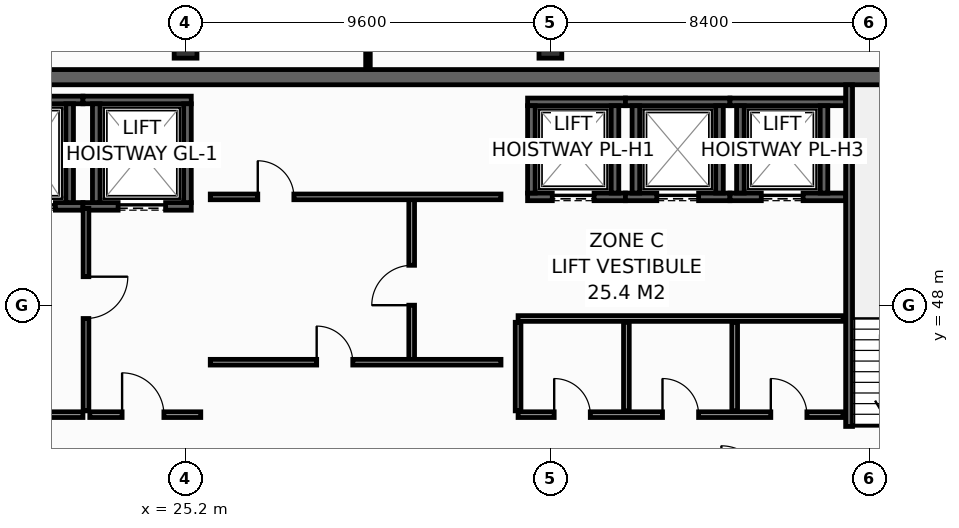
"""IFC4 building model, lengths in metres.
Left out: names, types, materials, properties, quantities, classifications, styles, units other than length and angle.
Written with IfcOpenShell. Run it as: python <this file> out.ifc"""

import sys

from ifc_helpers import new_model, si_unit, direction, frame, frame_2d, origin, origin_2d, place, context, subcontext, project, spatial, rectangle, hollow_rectangle, extrude, element, fill, save


model = new_model("IFC4")
c1 = context("Model", 3, precision=1e-05, world=origin(), true_north=direction((0.0, 1.0)))
c2 = subcontext(c1, "Body", "Model", "MODEL_VIEW")
j1 = project(units=[si_unit("LENGTHUNIT", "METRE"), si_unit("PLANEANGLEUNIT", "RADIAN")], contexts=[c1])
p1 = place(None, origin())
s1 = spatial("IfcSite", under=j1, at=p1, CompositionType="ELEMENT")
p2 = place(p1, origin())
s2 = spatial("IfcBuilding", under=s1, at=p2, CompositionType="ELEMENT")
p3 = place(p2, frame((0.0, 0.0, 264.8)))
s3 = spatial("IfcBuildingStorey", under=s2, at=p3, CompositionType="ELEMENT", Elevation=264.8)
p4 = place(p3, frame((13.7, 54.0, 0.0), z_axis=(0.0, 0.0, 1.0), x_axis=(1.0, 0.0, 0.0)))
e1 = element("IfcWall", 1, at=p4, inside=s3, PredefinedType="SHEAR", context=c2, shape_type="SweptSolid", body=[
    extrude(rectangle(XDim=32.5, YDim=0.4, at=frame_2d((16.25, 0.0))), origin(), (0.0, 0.0, 1.0), 3.55),
])
for number, where, z_axis, x_axis in (
    (2, (25.2, 54.8, 0.0), (0.0, 0.0, 1.0), (1.0, 0.0, 0.0)),
    (3, (34.8, 54.8, 0.0), (0.0, 0.0, 1.0), (1.0, 0.0, 0.0)),
):
    element("IfcColumn", number, at=place(p3, frame(where, z_axis=z_axis, x_axis=x_axis)), inside=s3, PredefinedType="COLUMN", context=c2, shape_type="SweptSolid", body=[
        extrude(hollow_rectangle(XDim=0.6, YDim=0.6, WallThickness=0.028, at=origin_2d()), origin(), (0.0, 0.0, 1.0), 3.8),
    ])
p5 = place(p3, frame((19.85, 50.6, 0.0), z_axis=(0.0, 0.0, 1.0), x_axis=(1.0, 0.0, 0.0)))
e4 = element("IfcWall", 4, at=p5, inside=s3, PredefinedType="SHEAR", context=c2, shape_type="SweptSolid", body=[
    extrude(rectangle(XDim=2.65, YDim=0.2, at=frame_2d((1.325, 0.0))), origin(), (0.0, 0.0, 1.0), 3.55),
])
p6 = place(p5, frame((0.675, 0.0, 0.0)))
e5 = element("IfcOpeningElement", 5, at=p6, cuts=e4, PredefinedType="OPENING", context=c2, shape_type="SweptSolid", body=[
    extrude(rectangle(XDim=1.25, YDim=2.3, at=frame_2d((0.625, 1.15))), frame((0.0, 0.11, 0.0), z_axis=(0.0, -1.0, 0.0), x_axis=(1.0, 0.0, 0.0)), (0.0, 0.0, 1.0), 0.22),
])
p7 = place(p3, frame((19.85, 53.4, 0.0), z_axis=(0.0, 0.0, 1.0), x_axis=(1.0, 0.0, 0.0)))
e6 = element("IfcWall", 6, at=p7, inside=s3, PredefinedType="SHEAR", context=c2, shape_type="SweptSolid", body=[
    extrude(rectangle(XDim=2.65, YDim=0.2, at=frame_2d((1.325, 0.0))), origin(), (0.0, 0.0, 1.0), 3.55),
])
p8 = place(p3, frame((22.15, 50.7, 0.0), z_axis=(0.0, 0.0, 1.0), x_axis=(0.0, 1.0, 0.0)))
e7 = element("IfcWall", 7, at=p8, inside=s3, PredefinedType="SHEAR", context=c2, shape_type="SweptSolid", body=[
    extrude(rectangle(XDim=2.6, YDim=0.2, at=frame_2d((1.3, 0.0))), origin(), (0.0, 0.0, 1.0), 3.55),
])
p9 = place(p3, frame((22.5, 50.6, 0.0), z_axis=(0.0, 0.0, 1.0), x_axis=(1.0, 0.0, 0.0)))
e8 = element("IfcWall", 8, at=p9, inside=s3, PredefinedType="SHEAR", context=c2, shape_type="SweptSolid", body=[
    extrude(rectangle(XDim=2.85, YDim=0.2, at=frame_2d((1.425, 0.0))), origin(), (0.0, 0.0, 1.0), 3.55),
])
p10 = place(p9, frame((0.925, 0.0, 0.0)))
e9 = element("IfcOpeningElement", 9, at=p10, cuts=e8, PredefinedType="OPENING", context=c2, shape_type="SweptSolid", body=[
    extrude(rectangle(XDim=1.25, YDim=2.3, at=frame_2d((0.625, 1.15))), frame((0.0, 0.11, 0.0), z_axis=(0.0, -1.0, 0.0), x_axis=(1.0, 0.0, 0.0)), (0.0, 0.0, 1.0), 0.22),
])
p11 = place(p3, frame((22.5, 53.4, 0.0), z_axis=(0.0, 0.0, 1.0), x_axis=(1.0, 0.0, 0.0)))
e10 = element("IfcWall", 10, at=p11, inside=s3, PredefinedType="SHEAR", context=c2, shape_type="SweptSolid", body=[
    extrude(rectangle(XDim=2.85, YDim=0.2, at=frame_2d((1.425, 0.0))), origin(), (0.0, 0.0, 1.0), 3.55),
])
for number, where, z_axis, x_axis in (
    (11, (22.85, 50.7, 0.0), (0.0, 0.0, 1.0), (0.0, 1.0, 0.0)),
    (12, (25.25, 50.7, 0.0), (0.0, 0.0, 1.0), (0.0, 1.0, 0.0)),
):
    element("IfcWall", number, at=place(p3, frame(where, z_axis=z_axis, x_axis=x_axis)), inside=s3, PredefinedType="SHEAR", context=c2, shape_type="SweptSolid", body=[
        extrude(rectangle(XDim=2.6, YDim=0.2, at=frame_2d((1.3, 0.0))), origin(), (0.0, 0.0, 1.0), 3.55),
    ])
p12 = place(p3, frame((34.2, 50.85, 0.0), z_axis=(0.0, 0.0, 1.0), x_axis=(1.0, 0.0, 0.0)))
e13 = element("IfcWall", 13, at=p12, inside=s3, PredefinedType="SHEAR", context=c2, shape_type="SweptSolid", body=[
    extrude(rectangle(XDim=2.575, YDim=0.2, at=frame_2d((1.288, 0.0))), origin(), (0.0, 0.0, 1.0), 3.55),
])
p13 = place(p12, frame((0.65, 0.0, 0.0)))
e14 = element("IfcOpeningElement", 14, at=p13, cuts=e13, PredefinedType="OPENING", context=c2, shape_type="SweptSolid", body=[
    extrude(rectangle(XDim=1.1, YDim=2.2, at=frame_2d((0.55, 1.1))), frame((0.0, 0.11, 0.0), z_axis=(0.0, -1.0, 0.0), x_axis=(1.0, 0.0, 0.0)), (0.0, 0.0, 1.0), 0.22),
])
p14 = place(p3, frame((34.2, 53.35, 0.0), z_axis=(0.0, 0.0, 1.0), x_axis=(1.0, 0.0, 0.0)))
e15 = element("IfcWall", 15, at=p14, inside=s3, PredefinedType="SHEAR", context=c2, shape_type="SweptSolid", body=[
    extrude(rectangle(XDim=2.575, YDim=0.2, at=frame_2d((1.288, 0.0))), origin(), (0.0, 0.0, 1.0), 3.55),
])
for number, where, z_axis, x_axis in (
    (16, (34.3, 50.95, 0.0), (0.0, 0.0, 1.0), (0.0, 1.0, 0.0)),
    (17, (36.5, 50.95, 0.0), (0.0, 0.0, 1.0), (0.0, 1.0, 0.0)),
):
    element("IfcWall", number, at=place(p3, frame(where, z_axis=z_axis, x_axis=x_axis)), inside=s3, PredefinedType="SHEAR", context=c2, shape_type="SweptSolid", body=[
        extrude(rectangle(XDim=2.3, YDim=0.2, at=frame_2d((1.15, 0.0))), origin(), (0.0, 0.0, 1.0), 3.55),
    ])
p15 = place(p3, frame((36.775, 50.85, 0.0), z_axis=(0.0, 0.0, 1.0), x_axis=(1.0, 0.0, 0.0)))
e18 = element("IfcWall", 18, at=p15, inside=s3, PredefinedType="SHEAR", context=c2, shape_type="SweptSolid", body=[
    extrude(rectangle(XDim=2.75, YDim=0.2, at=frame_2d((1.375, 0.0))), origin(), (0.0, 0.0, 1.0), 3.55),
])
p16 = place(p15, frame((0.825, 0.0, 0.0)))
e19 = element("IfcOpeningElement", 19, at=p16, cuts=e18, PredefinedType="OPENING", context=c2, shape_type="SweptSolid", body=[
    extrude(rectangle(XDim=1.1, YDim=2.2, at=frame_2d((0.55, 1.1))), frame((0.0, 0.11, 0.0), z_axis=(0.0, -1.0, 0.0), x_axis=(1.0, 0.0, 0.0)), (0.0, 0.0, 1.0), 0.22),
])
p17 = place(p3, frame((36.775, 53.35, 0.0), z_axis=(0.0, 0.0, 1.0), x_axis=(1.0, 0.0, 0.0)))
e20 = element("IfcWall", 20, at=p17, inside=s3, PredefinedType="SHEAR", context=c2, shape_type="SweptSolid", body=[
    extrude(rectangle(XDim=2.75, YDim=0.2, at=frame_2d((1.375, 0.0))), origin(), (0.0, 0.0, 1.0), 3.55),
])
for number, where, z_axis, x_axis in (
    (21, (37.05, 50.95, 0.0), (0.0, 0.0, 1.0), (0.0, 1.0, 0.0)),
    (22, (39.25, 50.95, 0.0), (0.0, 0.0, 1.0), (0.0, 1.0, 0.0)),
):
    element("IfcWall", number, at=place(p3, frame(where, z_axis=z_axis, x_axis=x_axis)), inside=s3, PredefinedType="SHEAR", context=c2, shape_type="SweptSolid", body=[
        extrude(rectangle(XDim=2.3, YDim=0.2, at=frame_2d((1.15, 0.0))), origin(), (0.0, 0.0, 1.0), 3.55),
    ])
p18 = place(p3, frame((39.525, 50.85, 0.0), z_axis=(0.0, 0.0, 1.0), x_axis=(1.0, 0.0, 0.0)))
e23 = element("IfcWall", 23, at=p18, inside=s3, PredefinedType="SHEAR", context=c2, shape_type="SweptSolid", body=[
    extrude(rectangle(XDim=3.045, YDim=0.2, at=frame_2d((1.522, 0.0))), origin(), (0.0, 0.0, 1.0), 3.55),
])
p19 = place(p18, frame((0.825, 0.0, 0.0)))
e24 = element("IfcOpeningElement", 24, at=p19, cuts=e23, PredefinedType="OPENING", context=c2, shape_type="SweptSolid", body=[
    extrude(rectangle(XDim=1.1, YDim=2.2, at=frame_2d((0.55, 1.1))), frame((0.0, 0.11, 0.0), z_axis=(0.0, -1.0, 0.0), x_axis=(1.0, 0.0, 0.0)), (0.0, 0.0, 1.0), 0.22),
])
p20 = place(p3, frame((39.525, 53.35, 0.0), z_axis=(0.0, 0.0, 1.0), x_axis=(1.0, 0.0, 0.0)))
e25 = element("IfcWall", 25, at=p20, inside=s3, PredefinedType="SHEAR", context=c2, shape_type="SweptSolid", body=[
    extrude(rectangle(XDim=3.045, YDim=0.2, at=frame_2d((1.522, 0.0))), origin(), (0.0, 0.0, 1.0), 3.55),
])
for number, where, z_axis, x_axis in (
    (26, (39.8, 50.95, 0.0), (0.0, 0.0, 1.0), (0.0, 1.0, 0.0)),
    (27, (42.0, 50.95, 0.0), (0.0, 0.0, 1.0), (0.0, 1.0, 0.0)),
):
    element("IfcWall", number, at=place(p3, frame(where, z_axis=z_axis, x_axis=x_axis)), inside=s3, PredefinedType="SHEAR", context=c2, shape_type="SweptSolid", body=[
        extrude(rectangle(XDim=2.3, YDim=0.2, at=frame_2d((1.15, 0.0))), origin(), (0.0, 0.0, 1.0), 3.55),
    ])
p21 = place(p3, frame((42.66, 53.8, 0.0), z_axis=(0.0, 0.0, 1.0), x_axis=(0.0, -1.0, 0.0)))
e28 = element("IfcWall", 28, at=p21, inside=s3, PredefinedType="SHEAR", context=c2, shape_type="SweptSolid", body=[
    extrude(rectangle(XDim=10.4, YDim=0.18, at=frame_2d((5.2, 0.0))), origin(), (0.0, 0.0, 1.0), 3.55),
])
p22 = place(p21, frame((8.99, 0.0, 0.0)))
e29 = element("IfcOpeningElement", 29, at=p22, cuts=e28, PredefinedType="OPENING", context=c2, shape_type="SweptSolid", body=[
    extrude(rectangle(XDim=1.1, YDim=2.15, at=frame_2d((0.55, 1.075))), frame((0.0, 0.1, 0.0), z_axis=(0.0, -1.0, 0.0), x_axis=(1.0, 0.0, 0.0)), (0.0, 0.0, 1.0), 0.2),
])
p23 = place(p3, frame((17.36, 45.12, 0.0), z_axis=(0.0, 0.0, 1.0), x_axis=(1.0, 0.0, 0.0)))
e30 = element("IfcWall", 30, at=p23, inside=s3, PredefinedType="PARTITIONING", context=c2, shape_type="SweptSolid", body=[
    extrude(rectangle(XDim=5.14, YDim=0.15, at=frame_2d((2.57, 0.0))), origin(), (0.0, 0.0, 1.0), 3.55),
])
p24 = place(p23, frame((1.8, 0.0, 0.0)))
e31 = element("IfcOpeningElement", 31, at=p24, cuts=e30, PredefinedType="OPENING", context=c2, shape_type="SweptSolid", body=[
    extrude(rectangle(XDim=1.1, YDim=2.15, at=frame_2d((0.55, 1.075))), frame((0.0, 0.085, 0.0), z_axis=(0.0, -1.0, 0.0), x_axis=(1.0, 0.0, 0.0)), (0.0, 0.0, 1.0), 0.17),
])
p25 = place(p3, frame((22.58, 50.55, 0.0), z_axis=(0.0, 0.0, 1.0), x_axis=(0.0, -1.0, 0.0)))
e32 = element("IfcWall", 32, at=p25, inside=s3, PredefinedType="PARTITIONING", context=c2, shape_type="SweptSolid", body=[
    extrude(rectangle(XDim=5.33, YDim=0.15, at=frame_2d((2.665, 0.0))), origin(), (0.0, 0.0, 1.0), 3.55),
])
p26 = place(p25, frame((1.8, 0.0, 0.0)))
e33 = element("IfcOpeningElement", 33, at=p26, cuts=e32, PredefinedType="OPENING", context=c2, shape_type="SweptSolid", body=[
    extrude(rectangle(XDim=1.1, YDim=2.15, at=frame_2d((0.55, 1.075))), frame((0.0, 0.085, 0.0), z_axis=(0.0, -1.0, 0.0), x_axis=(1.0, 0.0, 0.0)), (0.0, 0.0, 1.0), 0.17),
])
p27 = place(p3, frame((22.68, 45.12, 0.0), z_axis=(0.0, 0.0, 1.0), x_axis=(1.0, 0.0, 0.0)))
e34 = element("IfcWall", 34, at=p27, inside=s3, PredefinedType="PARTITIONING", context=c2, shape_type="SweptSolid", body=[
    extrude(rectangle(XDim=2.92, YDim=0.15, at=frame_2d((1.46, 0.0))), origin(), (0.0, 0.0, 1.0), 3.55),
])
p28 = place(p27, frame((0.85, 0.0, 0.0)))
e35 = element("IfcOpeningElement", 35, at=p28, cuts=e34, PredefinedType="OPENING", context=c2, shape_type="SweptSolid", body=[
    extrude(rectangle(XDim=1.1, YDim=2.15, at=frame_2d((0.55, 1.075))), frame((0.0, 0.085, 0.0), z_axis=(0.0, -1.0, 0.0), x_axis=(1.0, 0.0, 0.0)), (0.0, 0.0, 1.0), 0.17),
])
p29 = place(p3, frame((31.15, 46.5, 0.0), z_axis=(0.0, 0.0, 1.0), x_axis=(0.0, 1.0, 0.0)))
e36 = element("IfcWall", 36, at=p29, inside=s3, PredefinedType="PARTITIONING", context=c2, shape_type="SweptSolid", body=[
    extrude(rectangle(XDim=4.35, YDim=0.15, at=frame_2d((2.175, 0.0))), origin(), (0.0, 0.0, 1.0), 3.55),
])
p30 = place(p29, frame((1.5, 0.0, 0.0)))
e37 = element("IfcOpeningElement", 37, at=p30, cuts=e36, PredefinedType="OPENING", context=c2, shape_type="SweptSolid", body=[
    extrude(rectangle(XDim=1.05, YDim=2.15, at=frame_2d((0.525, 1.075))), frame((0.0, 0.085, 0.0), z_axis=(0.0, -1.0, 0.0), x_axis=(1.0, 0.0, 0.0)), (0.0, 0.0, 1.0), 0.17),
])
p31 = place(p3, frame((33.95, 45.12, 0.0), z_axis=(0.0, 0.0, 1.0), x_axis=(1.0, 0.0, 0.0)))
e38 = element("IfcWall", 38, at=p31, inside=s3, PredefinedType="PARTITIONING", context=c2, shape_type="SweptSolid", body=[
    extrude(rectangle(XDim=8.55, YDim=0.15, at=frame_2d((4.275, 0.0))), origin(), (0.0, 0.0, 1.0), 3.55),
])
p32 = place(p31, frame((0.95, 0.0, 0.0)))
e39 = element("IfcOpeningElement", 39, at=p32, cuts=e38, PredefinedType="OPENING", context=c2, shape_type="SweptSolid", body=[
    extrude(rectangle(XDim=0.95, YDim=2.15, at=frame_2d((0.475, 1.075))), frame((0.0, 0.085, 0.0), z_axis=(0.0, -1.0, 0.0), x_axis=(1.0, 0.0, 0.0)), (0.0, 0.0, 1.0), 0.17),
])
p33 = place(p31, frame((3.8, 0.0, 0.0)))
e40 = element("IfcOpeningElement", 40, at=p33, cuts=e38, PredefinedType="OPENING", context=c2, shape_type="SweptSolid", body=[
    extrude(rectangle(XDim=0.95, YDim=2.15, at=frame_2d((0.475, 1.075))), frame((0.0, 0.085, 0.0), z_axis=(0.0, -1.0, 0.0), x_axis=(1.0, 0.0, 0.0)), (0.0, 0.0, 1.0), 0.17),
])
p34 = place(p31, frame((6.65, 0.0, 0.0)))
e41 = element("IfcOpeningElement", 41, at=p34, cuts=e38, PredefinedType="OPENING", context=c2, shape_type="SweptSolid", body=[
    extrude(rectangle(XDim=0.95, YDim=2.15, at=frame_2d((0.475, 1.075))), frame((0.0, 0.085, 0.0), z_axis=(0.0, -1.0, 0.0), x_axis=(1.0, 0.0, 0.0)), (0.0, 0.0, 1.0), 0.17),
])
p35 = place(p3, frame((33.95, 47.65, 0.0), z_axis=(0.0, 0.0, 1.0), x_axis=(1.0, 0.0, 0.0)))
e42 = element("IfcWall", 42, at=p35, inside=s3, PredefinedType="PARTITIONING", context=c2, shape_type="SweptSolid", body=[
    extrude(rectangle(XDim=8.55, YDim=0.15, at=frame_2d((4.275, 0.0))), origin(), (0.0, 0.0, 1.0), 3.55),
])
for number, where, z_axis, x_axis in (
    (43, (33.95, 45.22, 0.0), (0.0, 0.0, 1.0), (0.0, 1.0, 0.0)),
    (44, (36.8, 45.22, 0.0), (0.0, 0.0, 1.0), (0.0, 1.0, 0.0)),
    (45, (39.65, 45.22, 0.0), (0.0, 0.0, 1.0), (0.0, 1.0, 0.0)),
):
    element("IfcWall", number, at=place(p3, frame(where, z_axis=z_axis, x_axis=x_axis)), inside=s3, PredefinedType="PARTITIONING", context=c2, shape_type="SweptSolid", body=[
        extrude(rectangle(XDim=2.33, YDim=0.15, at=frame_2d((1.165, 0.0))), origin(), (0.0, 0.0, 1.0), 3.55),
    ])
p36 = place(p3, frame((25.85, 50.85, 0.0), z_axis=(0.0, 0.0, 1.0), x_axis=(1.0, 0.0, 0.0)))
e46 = element("IfcWall", 46, at=p36, inside=s3, PredefinedType="PARTITIONING", context=c2, shape_type="SweptSolid", body=[
    extrude(rectangle(XDim=7.65, YDim=0.15, at=frame_2d((3.825, 0.0))), origin(), (0.0, 0.0, 1.0), 3.55),
])
p37 = place(p36, frame((1.25, 0.0, 0.0)))
e47 = element("IfcOpeningElement", 47, at=p37, cuts=e46, PredefinedType="OPENING", context=c2, shape_type="SweptSolid", body=[
    extrude(rectangle(XDim=0.95, YDim=2.15, at=frame_2d((0.475, 1.075))), frame((0.0, 0.085, 0.0), z_axis=(0.0, -1.0, 0.0), x_axis=(1.0, 0.0, 0.0)), (0.0, 0.0, 1.0), 0.17),
])
p38 = place(p3, frame((25.85, 46.5, 0.0), z_axis=(0.0, 0.0, 1.0), x_axis=(1.0, 0.0, 0.0)))
e48 = element("IfcWall", 48, at=p38, inside=s3, PredefinedType="PARTITIONING", context=c2, shape_type="SweptSolid", body=[
    extrude(rectangle(XDim=7.65, YDim=0.15, at=frame_2d((3.825, 0.0))), origin(), (0.0, 0.0, 1.0), 3.55),
])
p39 = place(p38, frame((2.8, 0.0, 0.0)))
e49 = element("IfcOpeningElement", 49, at=p39, cuts=e48, PredefinedType="OPENING", context=c2, shape_type="SweptSolid", body=[
    extrude(rectangle(XDim=0.95, YDim=2.15, at=frame_2d((0.475, 1.075))), frame((0.0, 0.085, 0.0), z_axis=(0.0, -1.0, 0.0), x_axis=(1.0, 0.0, 0.0)), (0.0, 0.0, 1.0), 0.17),
])
p40 = place(p3, frame((30.0, 54.22, 0.0), z_axis=(0.0, 0.0, 1.0), x_axis=(0.0, 1.0, 0.0)))
e50 = element("IfcWall", 50, at=p40, inside=s3, PredefinedType="PARTITIONING", context=c2, shape_type="SweptSolid", body=[
    extrude(rectangle(XDim=1.775, YDim=0.12, at=frame_2d((0.888, 0.0))), origin(), (0.0, 0.0, 1.0), 2.935),
])
p41 = place(p6, origin())
e51 = element("IfcDoor", 51, at=p41, inside=s3, OperationType="SLIDING_TO_LEFT", PredefinedType="DOOR", context=c2, shape_type="SweptSolid", body=[
    extrude(rectangle(XDim=1.25, YDim=2.3, at=frame_2d((0.625, 1.15))), frame((0.0, 0.025, 0.0), z_axis=(0.0, -1.0, 0.0), x_axis=(1.0, 0.0, 0.0)), (0.0, 0.0, 1.0), 0.05),
])
fill(e5, e51)
p42 = place(p10, origin())
e52 = element("IfcDoor", 52, at=p42, inside=s3, OperationType="SLIDING_TO_LEFT", PredefinedType="DOOR", context=c2, shape_type="SweptSolid", body=[
    extrude(rectangle(XDim=1.25, YDim=2.3, at=frame_2d((0.625, 1.15))), frame((0.0, 0.025, 0.0), z_axis=(0.0, -1.0, 0.0), x_axis=(1.0, 0.0, 0.0)), (0.0, 0.0, 1.0), 0.05),
])
fill(e9, e52)
p43 = place(p13, origin())
e53 = element("IfcDoor", 53, at=p43, inside=s3, OperationType="SLIDING_TO_LEFT", PredefinedType="DOOR", context=c2, shape_type="SweptSolid", body=[
    extrude(rectangle(XDim=1.1, YDim=2.2, at=frame_2d((0.55, 1.1))), frame((0.0, 0.025, 0.0), z_axis=(0.0, -1.0, 0.0), x_axis=(1.0, 0.0, 0.0)), (0.0, 0.0, 1.0), 0.05),
])
fill(e14, e53)
p44 = place(p16, origin())
e54 = element("IfcDoor", 54, at=p44, inside=s3, OperationType="SLIDING_TO_LEFT", PredefinedType="DOOR", context=c2, shape_type="SweptSolid", body=[
    extrude(rectangle(XDim=1.1, YDim=2.2, at=frame_2d((0.55, 1.1))), frame((0.0, 0.025, 0.0), z_axis=(0.0, -1.0, 0.0), x_axis=(1.0, 0.0, 0.0)), (0.0, 0.0, 1.0), 0.05),
])
fill(e19, e54)
p45 = place(p19, origin())
e55 = element("IfcDoor", 55, at=p45, inside=s3, OperationType="SLIDING_TO_LEFT", PredefinedType="DOOR", context=c2, shape_type="SweptSolid", body=[
    extrude(rectangle(XDim=1.1, YDim=2.2, at=frame_2d((0.55, 1.1))), frame((0.0, 0.025, 0.0), z_axis=(0.0, -1.0, 0.0), x_axis=(1.0, 0.0, 0.0)), (0.0, 0.0, 1.0), 0.05),
])
fill(e24, e55)
p46 = place(p22, origin())
e56 = element("IfcDoor", 56, at=p46, inside=s3, OperationType="SINGLE_SWING_LEFT", PredefinedType="DOOR", context=c2, shape_type="SweptSolid", body=[
    extrude(rectangle(XDim=1.1, YDim=2.15, at=frame_2d((0.55, 1.075))), frame((0.0, 0.025, 0.0), z_axis=(0.0, -1.0, 0.0), x_axis=(1.0, 0.0, 0.0)), (0.0, 0.0, 1.0), 0.05),
])
fill(e29, e56)
p47 = place(p26, origin())
e57 = element("IfcDoor", 57, at=p47, inside=s3, OperationType="SINGLE_SWING_LEFT", PredefinedType="DOOR", context=c2, shape_type="SweptSolid", body=[
    extrude(rectangle(XDim=1.1, YDim=2.15, at=frame_2d((0.55, 1.075))), frame((0.0, 0.025, 0.0), z_axis=(0.0, -1.0, 0.0), x_axis=(1.0, 0.0, 0.0)), (0.0, 0.0, 1.0), 0.05),
])
fill(e33, e57)
p48 = place(p28, origin())
e58 = element("IfcDoor", 58, at=p48, inside=s3, OperationType="SINGLE_SWING_LEFT", PredefinedType="DOOR", context=c2, shape_type="SweptSolid", body=[
    extrude(rectangle(XDim=1.1, YDim=2.15, at=frame_2d((0.55, 1.075))), frame((0.0, 0.025, 0.0), z_axis=(0.0, -1.0, 0.0), x_axis=(1.0, 0.0, 0.0)), (0.0, 0.0, 1.0), 0.05),
])
fill(e35, e58)
p49 = place(p30, origin())
e59 = element("IfcDoor", 59, at=p49, inside=s3, OperationType="SINGLE_SWING_LEFT", PredefinedType="DOOR", context=c2, shape_type="SweptSolid", body=[
    extrude(rectangle(XDim=1.05, YDim=2.15, at=frame_2d((0.525, 1.075))), frame((0.0, 0.025, 0.0), z_axis=(0.0, -1.0, 0.0), x_axis=(1.0, 0.0, 0.0)), (0.0, 0.0, 1.0), 0.05),
])
fill(e37, e59)
p50 = place(p32, origin())
e60 = element("IfcDoor", 60, at=p50, inside=s3, OperationType="SINGLE_SWING_LEFT", PredefinedType="DOOR", context=c2, shape_type="SweptSolid", body=[
    extrude(rectangle(XDim=0.95, YDim=2.15, at=frame_2d((0.475, 1.075))), frame((0.0, 0.025, 0.0), z_axis=(0.0, -1.0, 0.0), x_axis=(1.0, 0.0, 0.0)), (0.0, 0.0, 1.0), 0.05),
])
fill(e39, e60)
p51 = place(p33, origin())
e61 = element("IfcDoor", 61, at=p51, inside=s3, OperationType="SINGLE_SWING_LEFT", PredefinedType="DOOR", context=c2, shape_type="SweptSolid", body=[
    extrude(rectangle(XDim=0.95, YDim=2.15, at=frame_2d((0.475, 1.075))), frame((0.0, 0.025, 0.0), z_axis=(0.0, -1.0, 0.0), x_axis=(1.0, 0.0, 0.0)), (0.0, 0.0, 1.0), 0.05),
])
fill(e40, e61)
p52 = place(p34, origin())
e62 = element("IfcDoor", 62, at=p52, inside=s3, OperationType="SINGLE_SWING_LEFT", PredefinedType="DOOR", context=c2, shape_type="SweptSolid", body=[
    extrude(rectangle(XDim=0.95, YDim=2.15, at=frame_2d((0.475, 1.075))), frame((0.0, 0.025, 0.0), z_axis=(0.0, -1.0, 0.0), x_axis=(1.0, 0.0, 0.0)), (0.0, 0.0, 1.0), 0.05),
])
fill(e41, e62)
p53 = place(p37, origin())
e63 = element("IfcDoor", 63, at=p53, inside=s3, OperationType="SINGLE_SWING_LEFT", PredefinedType="DOOR", context=c2, shape_type="SweptSolid", body=[
    extrude(rectangle(XDim=0.95, YDim=2.15, at=frame_2d((0.475, 1.075))), frame((0.0, 0.025, 0.0), z_axis=(0.0, -1.0, 0.0), x_axis=(1.0, 0.0, 0.0)), (0.0, 0.0, 1.0), 0.05),
])
fill(e47, e63)
p54 = place(p39, origin())
e64 = element("IfcDoor", 64, at=p54, inside=s3, OperationType="SINGLE_SWING_LEFT", PredefinedType="DOOR", context=c2, shape_type="SweptSolid", body=[
    extrude(rectangle(XDim=0.95, YDim=2.15, at=frame_2d((0.475, 1.075))), frame((0.0, 0.025, 0.0), z_axis=(0.0, -1.0, 0.0), x_axis=(1.0, 0.0, 0.0)), (0.0, 0.0, 1.0), 0.05),
])
fill(e49, e64)
save(model, sys.argv[1])
